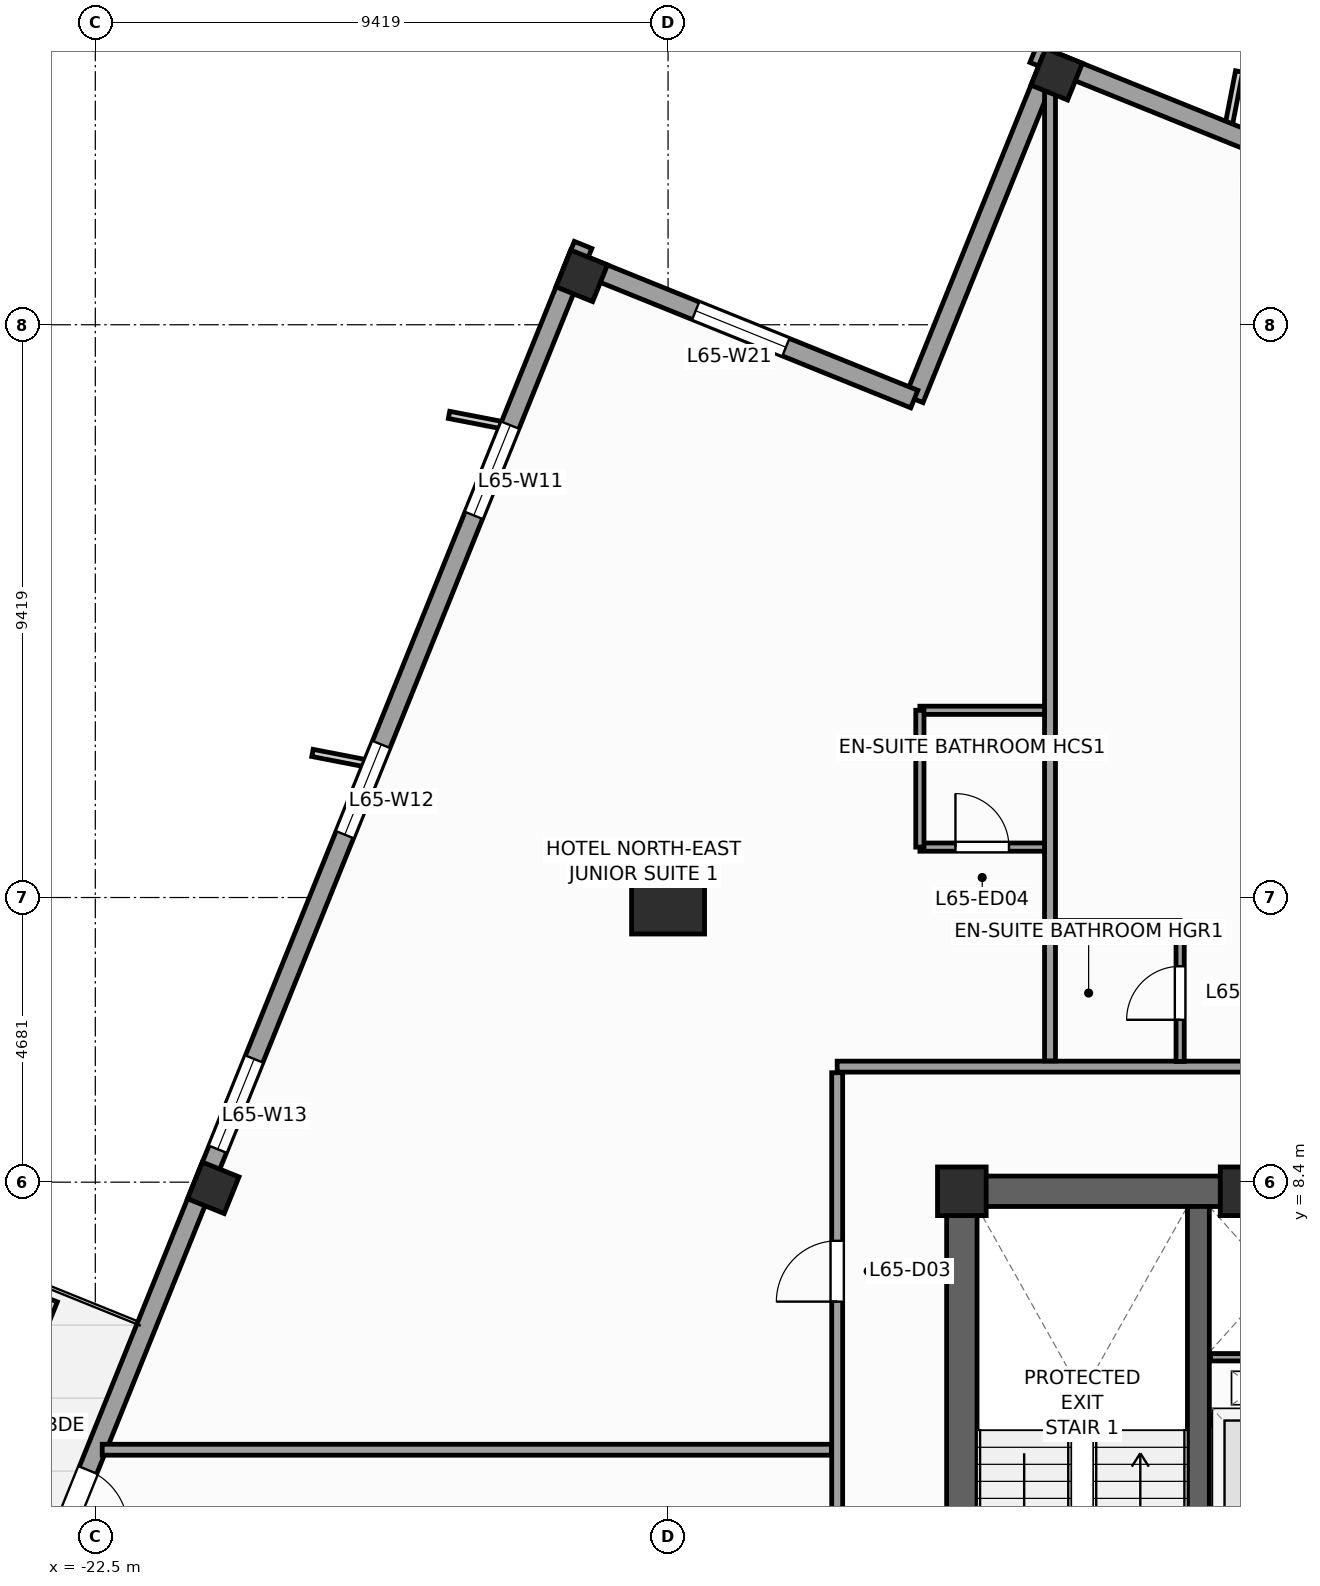
"""IFC4 building model, lengths in metres.
Left out: names, types, materials, properties, quantities, classifications, styles, units other than length and angle.
Written with IfcOpenShell. Run it as: python <this file> out.ifc"""

import sys

from ifc_helpers import new_model, si_unit, direction, frame, frame_2d, origin, origin_2d, place, context, subcontext, project, spatial, rectangle, extrude, source, transform, mapped, element, fill, save


model = new_model("IFC4")
c1 = context("Model", 3, precision=1e-05, world=origin(), true_north=direction((0.0, 1.0)))
c2 = subcontext(c1, "Body", "Model", "MODEL_VIEW")
j1 = project(units=[si_unit("LENGTHUNIT", "METRE"), si_unit("PLANEANGLEUNIT", "RADIAN")], contexts=[c1])
p1 = place(None, origin())
s1 = spatial("IfcSite", under=j1, at=p1, CompositionType="ELEMENT")
p2 = place(p1, origin())
s2 = spatial("IfcBuilding", under=s1, at=p2, CompositionType="ELEMENT")
p3 = place(p2, frame((0.0, 0.0, 268.8)))
s3 = spatial("IfcBuildingStorey", under=s2, at=p3, CompositionType="ELEMENT", Elevation=268.8)
p4 = place(p3, frame((-8.5, 8.25, 0.0), z_axis=(0.0, 0.0, 1.0), x_axis=(1.0, 0.0, 0.0)))
e1 = element("IfcWall", 1, at=p4, inside=s3, PredefinedType="SHEAR", context=c2, shape_type="SweptSolid", body=[
    extrude(rectangle(XDim=17.0, YDim=0.5, at=frame_2d((8.5, 0.0))), origin(), (0.0, 0.0, 1.0), 3.6),
])
p5 = place(p3, frame((-8.25, -8.0, 0.0), z_axis=(0.0, 0.0, 1.0), x_axis=(0.0, 1.0, 0.0)))
e2 = element("IfcWall", 2, at=p5, inside=s3, PredefinedType="SHEAR", context=c2, shape_type="SweptSolid", body=[
    extrude(rectangle(XDim=16.0, YDim=0.5, at=frame_2d((8.0, 0.0))), origin(), (0.0, 0.0, 1.0), 3.6),
])
p6 = place(p5, frame((4.69, 0.0, 0.0)))
e3 = element("IfcOpeningElement", 3, at=p6, cuts=e2, PredefinedType="OPENING", context=c2, shape_type="SweptSolid", body=[
    extrude(rectangle(XDim=1.3, YDim=2.2, at=frame_2d((0.65, 1.1))), frame((0.0, 0.26, 0.0), z_axis=(0.0, -1.0, 0.0), x_axis=(1.0, 0.0, 0.0)), (0.0, 0.0, 1.0), 0.52),
])
p7 = place(p3, frame((-4.36, -8.0, 0.0), z_axis=(0.0, 0.0, 1.0), x_axis=(0.0, 1.0, 0.0)))
e4 = element("IfcWall", 4, at=p7, inside=s3, PredefinedType="SHEAR", context=c2, shape_type="SweptSolid", body=[
    extrude(rectangle(XDim=16.0, YDim=0.36, at=frame_2d((8.0, 0.0))), origin(), (0.0, 0.0, 1.0), 3.6),
])
m1 = source(origin(), c2, "Body", "SweptSolid", [
    extrude(rectangle(XDim=0.8, YDim=0.8, at=origin_2d()), origin(), (0.0, 0.0, 1.0), 3.6),
])
for number, where, z_axis, x_axis in (
    (5, (-8.25, 8.25, 0.0), (0.0, 0.0, 1.0), (1.0, 0.0, 0.0)),
    (6, (-3.6, 8.25, 0.0), (0.0, 0.0, 1.0), (1.0, 0.0, 0.0)),
):
    element("IfcColumn", number, at=place(p3, frame(where, z_axis=z_axis, x_axis=x_axis)), inside=s3, PredefinedType="PILASTER", context=c2, shape_type="MappedRepresentation", body=[
        mapped(m1, transform((0.0, 0.0, 0.0), scale=1.0)),
    ])
m2 = source(origin(), c2, "Body", "SweptSolid", [
    extrude(rectangle(XDim=1.2, YDim=1.2, at=origin_2d()), origin(), (0.0, 0.0, 1.0), 3.6),
])
p8 = place(p3, frame((-13.081, 13.081, 0.0), z_axis=(0.0, 0.0, 1.0), x_axis=(1.0, 0.0, 0.0)))
e7 = element("IfcColumn", 7, at=p8, inside=s3, PredefinedType="COLUMN", context=c2, shape_type="MappedRepresentation", body=[
    mapped(m2, transform((0.0, 0.0, 0.0), scale=1.0)),
])
m3 = source(origin(), c2, "Body", "SweptSolid", [
    extrude(rectangle(XDim=0.65, YDim=0.65, at=origin_2d()), origin(), (0.0, 0.0, 1.0), 3.6),
])
for number, where, z_axis, x_axis in (
    (8, (-6.69, 26.62, 0.0), (0.0, 0.0, 1.0), (0.375, 0.927, 0.0)),
    (9, (-14.501, 23.304, 0.0), (0.0, 0.0, 1.0), (0.375, 0.927, 0.0)),
    (10, (-20.56, 8.307, 0.0), (0.0, 0.0, 1.0), (0.375, 0.927, 0.0)),
):
    element("IfcColumn", number, at=place(p3, frame(where, z_axis=z_axis, x_axis=x_axis)), inside=s3, PredefinedType="COLUMN", context=c2, shape_type="MappedRepresentation", body=[
        mapped(m3, transform((0.0, 0.0, 0.0), scale=1.0)),
    ])
p9 = place(p3, frame((23.813, 14.479, 0.0), z_axis=(0.0, 0.0, 1.0), x_axis=(-0.927182657188, 0.374609557019, 0.0)))
e11 = element("IfcWall", 11, at=p9, inside=s3, PredefinedType="STANDARD", context=c2, shape_type="SweptSolid", body=[
    extrude(rectangle(XDim=33.31, YDim=0.31, at=frame_2d((16.655, 0.0))), origin(), (0.0, 0.0, 1.0), 2.75),
])
p10 = place(p9, frame((3.197, 0.0, 0.47)))
e12 = element("IfcOpeningElement", 12, at=p10, cuts=e11, PredefinedType="OPENING", context=c2, shape_type="SweptSolid", body=[
    extrude(rectangle(XDim=1.6, YDim=2.1, at=frame_2d((0.8, 1.05))), frame((0.0, 0.165, 0.0), z_axis=(0.0, -1.0, 0.0), x_axis=(1.0, 0.0, 0.0)), (0.0, 0.0, 1.0), 0.33),
])
p11 = place(p9, frame((8.86, 0.0, 0.47)))
e13 = element("IfcOpeningElement", 13, at=p11, cuts=e11, PredefinedType="OPENING", context=c2, shape_type="SweptSolid", body=[
    extrude(rectangle(XDim=1.6, YDim=2.1, at=frame_2d((0.8, 1.05))), frame((0.0, 0.165, 0.0), z_axis=(0.0, -1.0, 0.0), x_axis=(1.0, 0.0, 0.0)), (0.0, 0.0, 1.0), 0.33),
])
p12 = place(p9, frame((13.689, 0.0, 0.47)))
e14 = element("IfcOpeningElement", 14, at=p12, cuts=e11, PredefinedType="OPENING", context=c2, shape_type="SweptSolid", body=[
    extrude(rectangle(XDim=1.6, YDim=2.1, at=frame_2d((0.8, 1.05))), frame((0.0, 0.165, 0.0), z_axis=(0.0, -1.0, 0.0), x_axis=(1.0, 0.0, 0.0)), (0.0, 0.0, 1.0), 0.33),
])
p13 = place(p9, frame((21.851, 0.0, 0.47)))
e15 = element("IfcOpeningElement", 15, at=p13, cuts=e11, PredefinedType="OPENING", context=c2, shape_type="SweptSolid", body=[
    extrude(rectangle(XDim=1.6, YDim=2.1, at=frame_2d((0.8, 1.05))), frame((0.0, 0.165, 0.0), z_axis=(0.0, -1.0, 0.0), x_axis=(1.0, 0.0, 0.0)), (0.0, 0.0, 1.0), 0.33),
])
p14 = place(p9, frame((27.847, 0.0, 0.47)))
e16 = element("IfcOpeningElement", 16, at=p14, cuts=e11, PredefinedType="OPENING", context=c2, shape_type="SweptSolid", body=[
    extrude(rectangle(XDim=1.6, YDim=2.1, at=frame_2d((0.8, 1.05))), frame((0.0, 0.165, 0.0), z_axis=(0.0, -1.0, 0.0), x_axis=(1.0, 0.0, 0.0)), (0.0, 0.0, 1.0), 0.33),
])
p15 = place(p3, frame((-6.784, 26.841, 0.0), z_axis=(0.0, 0.0, 1.0), x_axis=(-0.374636620962, -0.927171722085, 0.0)))
e17 = element("IfcWall", 17, at=p15, inside=s3, PredefinedType="STANDARD", context=c2, shape_type="SweptSolid", body=[
    extrude(rectangle(XDim=6.0, YDim=0.31, at=frame_2d((3.0, 0.0))), origin(), (0.0, 0.0, 1.0), 2.65),
])
p16 = place(p3, frame((-9.032, 21.278, 0.0), z_axis=(0.0, 0.0, 1.0), x_axis=(-0.927185411764, 0.374602739196, 0.0)))
e18 = element("IfcWall", 18, at=p16, inside=s3, PredefinedType="STANDARD", context=c2, shape_type="SweptSolid", body=[
    extrude(rectangle(XDim=6.155, YDim=0.31, at=frame_2d((3.078, 0.0))), origin(), (0.0, 0.0, 1.0), 3.35),
])
p17 = place(p16, frame((2.278, 0.0, 0.47)))
e19 = element("IfcOpeningElement", 19, at=p17, cuts=e18, PredefinedType="OPENING", context=c2, shape_type="SweptSolid", body=[
    extrude(rectangle(XDim=1.6, YDim=2.1, at=frame_2d((0.8, 1.05))), frame((0.0, 0.165, 0.0), z_axis=(0.0, -1.0, 0.0), x_axis=(1.0, 0.0, 0.0)), (0.0, 0.0, 1.0), 0.33),
])
p18 = place(p3, frame((-14.479, 23.813, 0.0), z_axis=(0.0, 0.0, 1.0), x_axis=(-0.374609557019, -0.927182657188, 0.0)))
e20 = element("IfcWall", 20, at=p18, inside=s3, PredefinedType="STANDARD", context=c2, shape_type="SweptSolid", body=[
    extrude(rectangle(XDim=33.31, YDim=0.31, at=frame_2d((16.655, 0.0))), origin(), (0.0, 0.0, 1.0), 2.75),
])
p19 = place(p18, frame((21.73, 0.0, 0.0)))
e21 = element("IfcOpeningElement", 21, at=p19, cuts=e20, PredefinedType="OPENING", context=c2, shape_type="SweptSolid", body=[
    extrude(rectangle(XDim=1.05, YDim=2.25, at=frame_2d((0.525, 1.125))), frame((0.0, 0.165, 0.0), z_axis=(0.0, -1.0, 0.0), x_axis=(1.0, 0.0, 0.0)), (0.0, 0.0, 1.0), 0.33),
])
p20 = place(p18, frame((3.197, 0.0, 0.47)))
e22 = element("IfcOpeningElement", 22, at=p20, cuts=e20, PredefinedType="OPENING", context=c2, shape_type="SweptSolid", body=[
    extrude(rectangle(XDim=1.6, YDim=2.1, at=frame_2d((0.8, 1.05))), frame((0.0, 0.165, 0.0), z_axis=(0.0, -1.0, 0.0), x_axis=(1.0, 0.0, 0.0)), (0.0, 0.0, 1.0), 0.33),
])
p21 = place(p18, frame((8.86, 0.0, 0.47)))
e23 = element("IfcOpeningElement", 23, at=p21, cuts=e20, PredefinedType="OPENING", context=c2, shape_type="SweptSolid", body=[
    extrude(rectangle(XDim=1.6, YDim=2.1, at=frame_2d((0.8, 1.05))), frame((0.0, 0.165, 0.0), z_axis=(0.0, -1.0, 0.0), x_axis=(1.0, 0.0, 0.0)), (0.0, 0.0, 1.0), 0.33),
])
p22 = place(p18, frame((14.439, 0.0, 0.47)))
e24 = element("IfcOpeningElement", 24, at=p22, cuts=e20, PredefinedType="OPENING", context=c2, shape_type="SweptSolid", body=[
    extrude(rectangle(XDim=1.6, YDim=2.1, at=frame_2d((0.8, 1.05))), frame((0.0, 0.165, 0.0), z_axis=(0.0, -1.0, 0.0), x_axis=(1.0, 0.0, 0.0)), (0.0, 0.0, 1.0), 0.33),
])
p23 = place(p18, frame((30.097, 0.0, 0.47)))
e25 = element("IfcOpeningElement", 25, at=p23, cuts=e20, PredefinedType="OPENING", context=c2, shape_type="SweptSolid", body=[
    extrude(rectangle(XDim=1.6, YDim=2.1, at=frame_2d((0.8, 1.05))), frame((0.0, 0.165, 0.0), z_axis=(0.0, -1.0, 0.0), x_axis=(1.0, 0.0, 0.0)), (0.0, 0.0, 1.0), 0.33),
])
p24 = place(p18, frame((27.374, 0.0, 0.47)))
e26 = element("IfcOpeningElement", 26, at=p24, cuts=e20, PredefinedType="OPENING", context=c2, shape_type="SweptSolid", body=[
    extrude(rectangle(XDim=1.6, YDim=2.1, at=frame_2d((0.8, 1.05))), frame((0.0, 0.165, 0.0), z_axis=(0.0, -1.0, 0.0), x_axis=(1.0, 0.0, 0.0)), (0.0, 0.0, 1.0), 0.33),
])
p25 = place(p3, frame((-4.17, 4.49, 0.0), z_axis=(0.0, 0.0, 1.0), x_axis=(1.0, 0.0, 0.0)))
e27 = element("IfcWall", 27, at=p25, inside=s3, PredefinedType="PARTITIONING", context=c2, shape_type="SweptSolid", body=[
    extrude(rectangle(XDim=2.28, YDim=0.18, at=frame_2d((1.14, 0.0))), origin(), (0.0, 0.0, 1.0), 3.35),
])
p26 = place(p3, frame((-4.16, 5.52, 0.0), z_axis=(0.0, 0.0, 1.0), x_axis=(1.0, 0.0, 0.0)))
e28 = element("IfcWall", 28, at=p26, inside=s3, PredefinedType="PARTITIONING", context=c2, shape_type="SweptSolid", body=[
    extrude(rectangle(XDim=2.1, YDim=0.12, at=frame_2d((1.05, 0.0))), origin(), (0.0, 0.0, 1.0), 3.35),
])
p27 = place(p3, frame((-10.3, 10.3, 0.0), z_axis=(0.0, 0.0, 1.0), x_axis=(1.0, 0.0, 0.0)))
e29 = element("IfcWall", 29, at=p27, inside=s3, PredefinedType="PARTITIONING", context=c2, shape_type="SweptSolid", body=[
    extrude(rectangle(XDim=21.7, YDim=0.18, at=frame_2d((10.85, 0.0))), origin(), (0.0, 0.0, 1.0), 3.35),
])
p28 = place(p27, frame((9.8, 0.0, 0.0)))
e30 = element("IfcOpeningElement", 30, at=p28, cuts=e29, PredefinedType="OPENING", context=c2, shape_type="SweptSolid", body=[
    extrude(rectangle(XDim=1.0, YDim=2.15, at=frame_2d((0.5, 1.075))), frame((0.0, 0.1, 0.0), z_axis=(0.0, -1.0, 0.0), x_axis=(1.0, 0.0, 0.0)), (0.0, 0.0, 1.0), 0.2),
])
p29 = place(p3, frame((-10.3, -11.3, 0.0), z_axis=(0.0, 0.0, 1.0), x_axis=(0.0, 1.0, 0.0)))
e31 = element("IfcWall", 31, at=p29, inside=s3, PredefinedType="PARTITIONING", context=c2, shape_type="SweptSolid", body=[
    extrude(rectangle(XDim=21.5, YDim=0.18, at=frame_2d((10.75, 0.0))), origin(), (0.0, 0.0, 1.0), 3.35),
])
p30 = place(p29, frame((12.9, 0.0, 0.0)))
e32 = element("IfcOpeningElement", 32, at=p30, cuts=e31, PredefinedType="OPENING", context=c2, shape_type="SweptSolid", body=[
    extrude(rectangle(XDim=1.0, YDim=2.15, at=frame_2d((0.5, 1.075))), frame((0.0, 0.1, 0.0), z_axis=(0.0, -1.0, 0.0), x_axis=(1.0, 0.0, 0.0)), (0.0, 0.0, 1.0), 0.2),
])
p31 = place(p29, frame((17.736, 0.0, 0.0)))
e33 = element("IfcOpeningElement", 33, at=p31, cuts=e31, PredefinedType="OPENING", context=c2, shape_type="SweptSolid", body=[
    extrude(rectangle(XDim=1.0, YDim=2.15, at=frame_2d((0.5, 1.075))), frame((0.0, 0.1, 0.0), z_axis=(0.0, -1.0, 0.0), x_axis=(1.0, 0.0, 0.0)), (0.0, 0.0, 1.0), 0.2),
])
p32 = place(p29, frame((1.714, 0.0, 0.0)))
e34 = element("IfcOpeningElement", 34, at=p32, cuts=e31, PredefinedType="OPENING", context=c2, shape_type="SweptSolid", body=[
    extrude(rectangle(XDim=1.0, YDim=2.15, at=frame_2d((0.5, 1.075))), frame((0.0, 0.1, 0.0), z_axis=(0.0, -1.0, 0.0), x_axis=(1.0, 0.0, 0.0)), (0.0, 0.0, 1.0), 0.2),
])
p33 = place(p29, frame((5.4, 0.0, 0.0)))
e35 = element("IfcOpeningElement", 35, at=p33, cuts=e31, PredefinedType="OPENING", context=c2, shape_type="SweptSolid", body=[
    extrude(rectangle(XDim=1.0, YDim=2.15, at=frame_2d((0.5, 1.075))), frame((0.0, 0.1, 0.0), z_axis=(0.0, -1.0, 0.0), x_axis=(1.0, 0.0, 0.0)), (0.0, 0.0, 1.0), 0.2),
])
p34 = place(p29, frame((9.1, 0.0, 0.0)))
e36 = element("IfcOpeningElement", 36, at=p34, cuts=e31, PredefinedType="OPENING", context=c2, shape_type="SweptSolid", body=[
    extrude(rectangle(XDim=1.0, YDim=2.15, at=frame_2d((0.5, 1.075))), frame((0.0, 0.1, 0.0), z_axis=(0.0, -1.0, 0.0), x_axis=(1.0, 0.0, 0.0)), (0.0, 0.0, 1.0), 0.2),
])
p35 = place(p3, frame((-6.8, 10.395, 0.0), z_axis=(0.0, 0.0, 1.0), x_axis=(0.0, 1.0, 0.0)))
e37 = element("IfcWall", 37, at=p35, inside=s3, PredefinedType="PARTITIONING", context=c2, shape_type="SweptSolid", body=[
    extrude(rectangle(XDim=16.167, YDim=0.18, at=frame_2d((8.083, 0.0))), origin(), (0.0, 0.0, 1.0), 3.35),
])
p36 = place(p3, frame((-10.395, 4.0, 0.0), z_axis=(0.0, 0.0, 1.0), x_axis=(-1.0, 0.0, 0.0)))
e38 = element("IfcWall", 38, at=p36, inside=s3, PredefinedType="PARTITIONING", context=c2, shape_type="SweptSolid", body=[
    extrude(rectangle(XDim=11.992, YDim=0.18, at=frame_2d((5.996, 0.0))), origin(), (0.0, 0.0, 1.0), 3.35),
])
p37 = place(p3, frame((-8.94, 13.91, 0.0), z_axis=(0.0, 0.0, 1.0), x_axis=(1.0, 0.0, 0.0)))
e39 = element("IfcWall", 39, at=p37, inside=s3, PredefinedType="PARTITIONING", context=c2, shape_type="SweptSolid", body=[
    extrude(rectangle(XDim=2.05, YDim=0.135, at=frame_2d((1.025, 0.0))), origin(), (0.0, 0.0, 1.0), 3.35),
])
p38 = place(p37, frame((0.585, 0.0, 0.0)))
e40 = element("IfcOpeningElement", 40, at=p38, cuts=e39, PredefinedType="OPENING", context=c2, shape_type="SweptSolid", body=[
    extrude(rectangle(XDim=0.88, YDim=2.1, at=frame_2d((0.44, 1.05))), frame((0.0, 0.078, 0.0), z_axis=(0.0, -1.0, 0.0), x_axis=(1.0, 0.0, 0.0)), (0.0, 0.0, 1.0), 0.155),
])
p39 = place(p3, frame((-8.94, 16.16, 0.0), z_axis=(0.0, 0.0, 1.0), x_axis=(1.0, 0.0, 0.0)))
e41 = element("IfcWall", 41, at=p39, inside=s3, PredefinedType="PARTITIONING", context=c2, shape_type="SweptSolid", body=[
    extrude(rectangle(XDim=2.05, YDim=0.135, at=frame_2d((1.025, 0.0))), origin(), (0.0, 0.0, 1.0), 3.35),
])
p40 = place(p3, frame((-8.94, 13.91, 0.0), z_axis=(0.0, 0.0, 1.0), x_axis=(0.0, 1.0, 0.0)))
e42 = element("IfcWall", 42, at=p40, inside=s3, PredefinedType="PARTITIONING", context=c2, shape_type="SweptSolid", body=[
    extrude(rectangle(XDim=2.25, YDim=0.135, at=frame_2d((1.125, 0.0))), origin(), (0.0, 0.0, 1.0), 3.35),
])
p41 = place(p3, frame((-4.66, 10.385, 0.0), z_axis=(0.0, 0.0, 1.0), x_axis=(0.0, 1.0, 0.0)))
e43 = element("IfcWall", 43, at=p41, inside=s3, PredefinedType="PARTITIONING", context=c2, shape_type="SweptSolid", body=[
    extrude(rectangle(XDim=2.25, YDim=0.135, at=frame_2d((1.125, 0.0))), origin(), (0.0, 0.0, 1.0), 3.35),
])
p42 = place(p41, frame((0.685, 0.0, 0.0)))
e44 = element("IfcOpeningElement", 44, at=p42, cuts=e43, PredefinedType="OPENING", context=c2, shape_type="SweptSolid", body=[
    extrude(rectangle(XDim=0.88, YDim=2.1, at=frame_2d((0.44, 1.05))), frame((0.0, 0.078, 0.0), z_axis=(0.0, -1.0, 0.0), x_axis=(1.0, 0.0, 0.0)), (0.0, 0.0, 1.0), 0.155),
])
p43 = place(p3, frame((-6.71, 12.635, 0.0), z_axis=(0.0, 0.0, 1.0), x_axis=(1.0, 0.0, 0.0)))
e45 = element("IfcWall", 45, at=p43, inside=s3, PredefinedType="PARTITIONING", context=c2, shape_type="SweptSolid", body=[
    extrude(rectangle(XDim=2.05, YDim=0.135, at=frame_2d((1.025, 0.0))), origin(), (0.0, 0.0, 1.0), 3.35),
])
m4 = source(origin(), c2, "Body", "SweptSolid", [
    extrude(rectangle(XDim=1.05, YDim=2.25, at=frame_2d((0.525, 1.125))), frame((0.0, 0.025, 0.0), z_axis=(0.0, -1.0, 0.0), x_axis=(1.0, 0.0, 0.0)), (0.0, 0.0, 1.0), 0.05),
])
p44 = place(p19, origin())
e46 = element("IfcDoor", 46, at=p44, inside=s3, OperationType="SINGLE_SWING_RIGHT", PredefinedType="DOOR", context=c2, shape_type="MappedRepresentation", body=[
    mapped(m4, transform((0.0, 0.0, 0.0), scale=1.0)),
])
fill(e21, e46)
m5 = source(origin(), c2, "Body", "SweptSolid", [
    extrude(rectangle(XDim=1.6, YDim=2.1, at=frame_2d((0.8, 1.05))), frame((0.0, 0.03, 0.0), z_axis=(0.0, -1.0, 0.0), x_axis=(1.0, 0.0, 0.0)), (0.0, 0.0, 1.0), 0.06),
])
p45 = place(p20, origin())
e47 = element("IfcWindow", 47, at=p45, inside=s3, PartitioningType="SINGLE_PANEL", PredefinedType="WINDOW", context=c2, shape_type="MappedRepresentation", body=[
    mapped(m5, transform((0.0, 0.0, 0.0), scale=1.0)),
])
fill(e22, e47)
p46 = place(p21, origin())
e48 = element("IfcWindow", 48, at=p46, inside=s3, PartitioningType="SINGLE_PANEL", PredefinedType="WINDOW", context=c2, shape_type="MappedRepresentation", body=[
    mapped(m5, transform((0.0, 0.0, 0.0), scale=1.0)),
])
fill(e23, e48)
p47 = place(p22, origin())
e49 = element("IfcWindow", 49, at=p47, inside=s3, PartitioningType="SINGLE_PANEL", PredefinedType="WINDOW", context=c2, shape_type="MappedRepresentation", body=[
    mapped(m5, transform((0.0, 0.0, 0.0), scale=1.0)),
])
fill(e24, e49)
p48 = place(p17, origin())
e50 = element("IfcWindow", 50, at=p48, inside=s3, PartitioningType="SINGLE_PANEL", PredefinedType="WINDOW", context=c2, shape_type="MappedRepresentation", body=[
    mapped(m5, transform((0.0, 0.0, 0.0), scale=1.0)),
])
fill(e19, e50)
m6 = source(origin(), c2, "Body", "SweptSolid", [
    extrude(rectangle(XDim=1.0, YDim=2.15, at=frame_2d((0.5, 1.075))), frame((0.0, 0.025, 0.0), z_axis=(0.0, -1.0, 0.0), x_axis=(1.0, 0.0, 0.0)), (0.0, 0.0, 1.0), 0.05),
])
p49 = place(p31, origin())
e51 = element("IfcDoor", 51, at=p49, inside=s3, OperationType="SINGLE_SWING_LEFT", PredefinedType="DOOR", context=c2, shape_type="MappedRepresentation", body=[
    mapped(m6, transform((0.0, 0.0, 0.0), scale=1.0)),
])
fill(e33, e51)
m7 = source(origin(), c2, "Body", "SweptSolid", [
    extrude(rectangle(XDim=0.88, YDim=2.1, at=frame_2d((0.44, 1.05))), frame((0.0, 0.025, 0.0), z_axis=(0.0, -1.0, 0.0), x_axis=(1.0, 0.0, 0.0)), (0.0, 0.0, 1.0), 0.05),
])
p50 = place(p38, origin())
e52 = element("IfcDoor", 52, at=p50, inside=s3, OperationType="SINGLE_SWING_LEFT", PredefinedType="DOOR", context=c2, shape_type="MappedRepresentation", body=[
    mapped(m7, transform((0.0, 0.0, 0.0), scale=1.0)),
])
fill(e40, e52)
p51 = place(p42, origin())
e53 = element("IfcDoor", 53, at=p51, inside=s3, OperationType="SINGLE_SWING_LEFT", PredefinedType="DOOR", context=c2, shape_type="MappedRepresentation", body=[
    mapped(m7, transform((0.0, 0.0, 0.0), scale=1.0)),
])
fill(e44, e53)
save(model, sys.argv[1])
